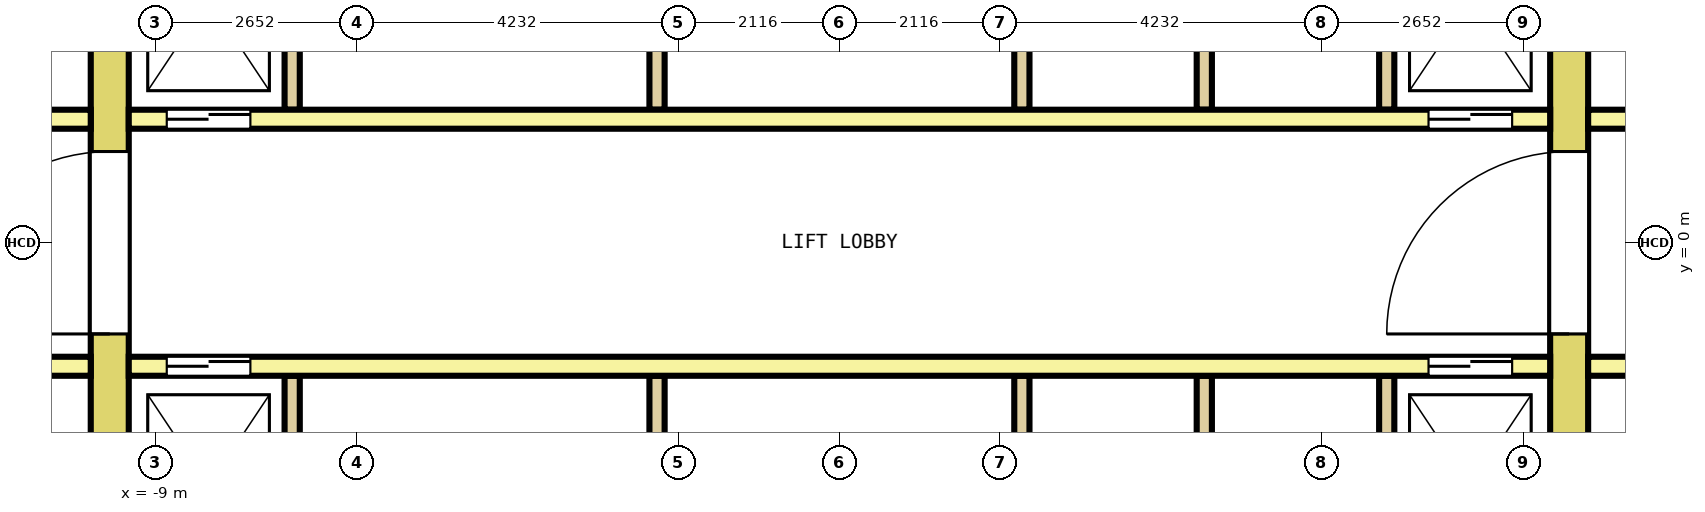
"""IFC4 building model, lengths in metres.
Left out: names, types, materials, properties, quantities, classifications, styles, units other than length and angle.
Written with IfcOpenShell. Run it as: python <this file> out.ifc"""

import sys

from ifc_helpers import new_model, si_unit, direction, frame, frame_2d, origin, place, context, subcontext, project, spatial, rectangle, extrude, element, fill, save


model = new_model("IFC4")
c1 = context("Model", 3, precision=1e-05, world=origin(), true_north=direction((0.0, 1.0)))
c2 = subcontext(c1, "Body", "Model", "MODEL_VIEW")
j1 = project(units=[si_unit("LENGTHUNIT", "METRE"), si_unit("PLANEANGLEUNIT", "RADIAN")], contexts=[c1])
p1 = place(None, origin())
s1 = spatial("IfcSite", under=j1, at=p1, CompositionType="ELEMENT")
p2 = place(p1, origin())
s2 = spatial("IfcBuilding", under=s1, at=p2, CompositionType="ELEMENT")
p3 = place(p2, frame((0.0, 0.0, 85.2)))
s3 = spatial("IfcBuildingStorey", under=s2, at=p3, CompositionType="ELEMENT", Elevation=85.2)
p4 = place(p3, frame((-9.6, -7.7, 0.0), z_axis=(0.0, 0.0, 1.0), x_axis=(0.0, 1.0, 0.0)))
e1 = element("IfcWall", 1, at=p4, inside=s3, PredefinedType="SHEAR", context=c2, shape_type="SweptSolid", body=[
    extrude(rectangle(XDim=15.4, YDim=0.5, at=frame_2d((7.7, 0.0))), origin(), (0.0, 0.0, 1.0), 4.1),
])
p5 = place(p4, frame((6.5, 0.0, 0.0)))
e2 = element("IfcOpeningElement", 2, at=p5, cuts=e1, PredefinedType="OPENING", context=c2, shape_type="SweptSolid", body=[
    extrude(rectangle(XDim=2.4, YDim=2.1, at=frame_2d((1.2, 1.05))), frame((0.0, 0.26, 0.0), z_axis=(0.0, -1.0, 0.0), x_axis=(1.0, 0.0, 0.0)), (0.0, 0.0, 1.0), 0.52),
])
p6 = place(p4, frame((13.4, 0.0, 0.0)))
e3 = element("IfcOpeningElement", 3, at=p6, cuts=e1, PredefinedType="OPENING", context=c2, shape_type="SweptSolid", body=[
    extrude(rectangle(XDim=1.2, YDim=2.1, at=frame_2d((0.6, 1.05))), frame((0.0, 0.26, 0.0), z_axis=(0.0, -1.0, 0.0), x_axis=(1.0, 0.0, 0.0)), (0.0, 0.0, 1.0), 0.52),
])
p7 = place(p4, frame((0.8, 0.0, 0.0)))
e4 = element("IfcOpeningElement", 4, at=p7, cuts=e1, PredefinedType="OPENING", context=c2, shape_type="SweptSolid", body=[
    extrude(rectangle(XDim=1.2, YDim=2.1, at=frame_2d((0.6, 1.05))), frame((0.0, 0.26, 0.0), z_axis=(0.0, -1.0, 0.0), x_axis=(1.0, 0.0, 0.0)), (0.0, 0.0, 1.0), 0.52),
])
p8 = place(p3, frame((9.6, -7.7, 0.0), z_axis=(0.0, 0.0, 1.0), x_axis=(0.0, 1.0, 0.0)))
e5 = element("IfcWall", 5, at=p8, inside=s3, PredefinedType="SHEAR", context=c2, shape_type="SweptSolid", body=[
    extrude(rectangle(XDim=15.4, YDim=0.5, at=frame_2d((7.7, 0.0))), origin(), (0.0, 0.0, 1.0), 4.1),
])
p9 = place(p8, frame((6.5, 0.0, 0.0)))
e6 = element("IfcOpeningElement", 6, at=p9, cuts=e5, PredefinedType="OPENING", context=c2, shape_type="SweptSolid", body=[
    extrude(rectangle(XDim=2.4, YDim=2.1, at=frame_2d((1.2, 1.05))), frame((0.0, 0.26, 0.0), z_axis=(0.0, -1.0, 0.0), x_axis=(1.0, 0.0, 0.0)), (0.0, 0.0, 1.0), 0.52),
])
p10 = place(p8, frame((13.4, 0.0, 0.0)))
e7 = element("IfcOpeningElement", 7, at=p10, cuts=e5, PredefinedType="OPENING", context=c2, shape_type="SweptSolid", body=[
    extrude(rectangle(XDim=1.2, YDim=2.1, at=frame_2d((0.6, 1.05))), frame((0.0, 0.26, 0.0), z_axis=(0.0, -1.0, 0.0), x_axis=(1.0, 0.0, 0.0)), (0.0, 0.0, 1.0), 0.52),
])
p11 = place(p8, frame((0.9, 0.0, 0.0)))
e8 = element("IfcOpeningElement", 8, at=p11, cuts=e5, PredefinedType="OPENING", context=c2, shape_type="SweptSolid", body=[
    extrude(rectangle(XDim=1.0, YDim=2.1, at=frame_2d((0.5, 1.05))), frame((0.0, 0.26, 0.0), z_axis=(0.0, -1.0, 0.0), x_axis=(1.0, 0.0, 0.0)), (0.0, 0.0, 1.0), 0.52),
])
p12 = place(p3, frame((-12.8, 1.625, 0.0), z_axis=(0.0, 0.0, 1.0), x_axis=(1.0, 0.0, 0.0)))
e9 = element("IfcWall", 9, at=p12, inside=s3, PredefinedType="SOLIDWALL", context=c2, shape_type="SweptSolid", body=[
    extrude(rectangle(XDim=2.95, YDim=0.25, at=frame_2d((1.475, 0.0))), origin(), (0.0, 0.0, 1.0), 4.1),
])
p13 = place(p12, frame((0.925, 0.0, 0.0)))
e10 = element("IfcOpeningElement", 10, at=p13, cuts=e9, PredefinedType="OPENING", context=c2, shape_type="SweptSolid", body=[
    extrude(rectangle(XDim=1.1, YDim=2.1, at=frame_2d((0.55, 1.05))), frame((0.0, 0.135, 0.0), z_axis=(0.0, -1.0, 0.0), x_axis=(1.0, 0.0, 0.0)), (0.0, 0.0, 1.0), 0.27),
])
p14 = place(p3, frame((-9.35, 1.625, 0.0), z_axis=(0.0, 0.0, 1.0), x_axis=(1.0, 0.0, 0.0)))
e11 = element("IfcWall", 11, at=p14, inside=s3, PredefinedType="SOLIDWALL", context=c2, shape_type="SweptSolid", body=[
    extrude(rectangle(XDim=18.7, YDim=0.25, at=frame_2d((9.35, 0.0))), origin(), (0.0, 0.0, 1.0), 4.1),
])
p15 = place(p14, frame((0.5, 0.0, 0.0)))
e12 = element("IfcOpeningElement", 12, at=p15, cuts=e11, PredefinedType="OPENING", context=c2, shape_type="SweptSolid", body=[
    extrude(rectangle(XDim=1.1, YDim=2.1, at=frame_2d((0.55, 1.05))), frame((0.0, 0.135, 0.0), z_axis=(0.0, -1.0, 0.0), x_axis=(1.0, 0.0, 0.0)), (0.0, 0.0, 1.0), 0.27),
])
p16 = place(p14, frame((17.1, 0.0, 0.0)))
e13 = element("IfcOpeningElement", 13, at=p16, cuts=e11, PredefinedType="OPENING", context=c2, shape_type="SweptSolid", body=[
    extrude(rectangle(XDim=1.1, YDim=2.1, at=frame_2d((0.55, 1.05))), frame((0.0, 0.135, 0.0), z_axis=(0.0, -1.0, 0.0), x_axis=(1.0, 0.0, 0.0)), (0.0, 0.0, 1.0), 0.27),
])
p17 = place(p3, frame((9.85, 1.625, 0.0), z_axis=(0.0, 0.0, 1.0), x_axis=(1.0, 0.0, 0.0)))
e14 = element("IfcWall", 14, at=p17, inside=s3, PredefinedType="SOLIDWALL", context=c2, shape_type="SweptSolid", body=[
    extrude(rectangle(XDim=2.95, YDim=0.25, at=frame_2d((1.475, 0.0))), origin(), (0.0, 0.0, 1.0), 4.1),
])
p18 = place(p17, frame((0.925, 0.0, 0.0)))
e15 = element("IfcOpeningElement", 15, at=p18, cuts=e14, PredefinedType="OPENING", context=c2, shape_type="SweptSolid", body=[
    extrude(rectangle(XDim=1.1, YDim=2.1, at=frame_2d((0.55, 1.05))), frame((0.0, 0.135, 0.0), z_axis=(0.0, -1.0, 0.0), x_axis=(1.0, 0.0, 0.0)), (0.0, 0.0, 1.0), 0.27),
])
for number, where, z_axis, x_axis in (
    (16, (-7.2, 1.75, 0.0), (0.0, 0.0, 1.0), (0.0, 1.0, 0.0)),
    (17, (-2.4, 1.75, 0.0), (0.0, 0.0, 1.0), (0.0, 1.0, 0.0)),
    (18, (2.4, 1.75, 0.0), (0.0, 0.0, 1.0), (0.0, 1.0, 0.0)),
    (19, (4.8, 1.75, 0.0), (0.0, 0.0, 1.0), (0.0, 1.0, 0.0)),
    (20, (7.2, 1.75, 0.0), (0.0, 0.0, 1.0), (0.0, 1.0, 0.0)),
):
    element("IfcWall", number, at=place(p3, frame(where, z_axis=z_axis, x_axis=x_axis)), inside=s3, PredefinedType="SOLIDWALL", context=c2, shape_type="SweptSolid", body=[
        extrude(rectangle(XDim=2.9, YDim=0.2, at=frame_2d((1.45, 0.0))), origin(), (0.0, 0.0, 1.0), 4.1),
    ])
p19 = place(p3, frame((-12.8, -1.625, 0.0), z_axis=(0.0, 0.0, 1.0), x_axis=(1.0, 0.0, 0.0)))
e21 = element("IfcWall", 21, at=p19, inside=s3, PredefinedType="SOLIDWALL", context=c2, shape_type="SweptSolid", body=[
    extrude(rectangle(XDim=2.95, YDim=0.25, at=frame_2d((1.475, 0.0))), origin(), (0.0, 0.0, 1.0), 4.1),
])
p20 = place(p19, frame((0.925, 0.0, 0.0)))
e22 = element("IfcOpeningElement", 22, at=p20, cuts=e21, PredefinedType="OPENING", context=c2, shape_type="SweptSolid", body=[
    extrude(rectangle(XDim=1.1, YDim=2.1, at=frame_2d((0.55, 1.05))), frame((0.0, 0.135, 0.0), z_axis=(0.0, -1.0, 0.0), x_axis=(1.0, 0.0, 0.0)), (0.0, 0.0, 1.0), 0.27),
])
p21 = place(p3, frame((-9.35, -1.625, 0.0), z_axis=(0.0, 0.0, 1.0), x_axis=(1.0, 0.0, 0.0)))
e23 = element("IfcWall", 23, at=p21, inside=s3, PredefinedType="SOLIDWALL", context=c2, shape_type="SweptSolid", body=[
    extrude(rectangle(XDim=18.7, YDim=0.25, at=frame_2d((9.35, 0.0))), origin(), (0.0, 0.0, 1.0), 4.1),
])
p22 = place(p21, frame((0.5, 0.0, 0.0)))
e24 = element("IfcOpeningElement", 24, at=p22, cuts=e23, PredefinedType="OPENING", context=c2, shape_type="SweptSolid", body=[
    extrude(rectangle(XDim=1.1, YDim=2.1, at=frame_2d((0.55, 1.05))), frame((0.0, 0.135, 0.0), z_axis=(0.0, -1.0, 0.0), x_axis=(1.0, 0.0, 0.0)), (0.0, 0.0, 1.0), 0.27),
])
p23 = place(p21, frame((17.1, 0.0, 0.0)))
e25 = element("IfcOpeningElement", 25, at=p23, cuts=e23, PredefinedType="OPENING", context=c2, shape_type="SweptSolid", body=[
    extrude(rectangle(XDim=1.1, YDim=2.1, at=frame_2d((0.55, 1.05))), frame((0.0, 0.135, 0.0), z_axis=(0.0, -1.0, 0.0), x_axis=(1.0, 0.0, 0.0)), (0.0, 0.0, 1.0), 0.27),
])
p24 = place(p3, frame((9.85, -1.625, 0.0), z_axis=(0.0, 0.0, 1.0), x_axis=(1.0, 0.0, 0.0)))
e26 = element("IfcWall", 26, at=p24, inside=s3, PredefinedType="SOLIDWALL", context=c2, shape_type="SweptSolid", body=[
    extrude(rectangle(XDim=2.95, YDim=0.25, at=frame_2d((1.475, 0.0))), origin(), (0.0, 0.0, 1.0), 4.1),
])
p25 = place(p24, frame((0.925, 0.0, 0.0)))
e27 = element("IfcOpeningElement", 27, at=p25, cuts=e26, PredefinedType="OPENING", context=c2, shape_type="SweptSolid", body=[
    extrude(rectangle(XDim=1.1, YDim=2.1, at=frame_2d((0.55, 1.05))), frame((0.0, 0.135, 0.0), z_axis=(0.0, -1.0, 0.0), x_axis=(1.0, 0.0, 0.0)), (0.0, 0.0, 1.0), 0.27),
])
for number, where, z_axis, x_axis in (
    (28, (-7.2, -4.65, 0.0), (0.0, 0.0, 1.0), (0.0, 1.0, 0.0)),
    (29, (-2.4, -4.65, 0.0), (0.0, 0.0, 1.0), (0.0, 1.0, 0.0)),
    (30, (2.4, -4.65, 0.0), (0.0, 0.0, 1.0), (0.0, 1.0, 0.0)),
    (31, (4.8, -4.65, 0.0), (0.0, 0.0, 1.0), (0.0, 1.0, 0.0)),
    (32, (7.2, -4.65, 0.0), (0.0, 0.0, 1.0), (0.0, 1.0, 0.0)),
):
    element("IfcWall", number, at=place(p3, frame(where, z_axis=z_axis, x_axis=x_axis)), inside=s3, PredefinedType="SOLIDWALL", context=c2, shape_type="SweptSolid", body=[
        extrude(rectangle(XDim=2.9, YDim=0.2, at=frame_2d((1.45, 0.0))), origin(), (0.0, 0.0, 1.0), 4.1),
    ])
p26 = place(p15, origin())
e33 = element("IfcDoor", 33, at=p26, inside=s3, OperationType="DOUBLE_DOOR_SLIDING", PredefinedType="DOOR", context=c2, shape_type="SweptSolid", body=[
    extrude(rectangle(XDim=1.1, YDim=2.1, at=frame_2d((0.55, 1.05))), frame((0.0, 0.075, 0.0), z_axis=(0.0, -1.0, 0.0), x_axis=(1.0, 0.0, 0.0)), (0.0, 0.0, 1.0), 0.15),
])
fill(e12, e33)
p27 = place(p16, origin())
e34 = element("IfcDoor", 34, at=p27, inside=s3, OperationType="DOUBLE_DOOR_SLIDING", PredefinedType="DOOR", context=c2, shape_type="SweptSolid", body=[
    extrude(rectangle(XDim=1.1, YDim=2.1, at=frame_2d((0.55, 1.05))), frame((0.0, 0.075, 0.0), z_axis=(0.0, -1.0, 0.0), x_axis=(1.0, 0.0, 0.0)), (0.0, 0.0, 1.0), 0.15),
])
fill(e13, e34)
p28 = place(p22, origin())
e35 = element("IfcDoor", 35, at=p28, inside=s3, OperationType="DOUBLE_DOOR_SLIDING", PredefinedType="DOOR", context=c2, shape_type="SweptSolid", body=[
    extrude(rectangle(XDim=1.1, YDim=2.1, at=frame_2d((0.55, 1.05))), frame((0.0, 0.075, 0.0), z_axis=(0.0, -1.0, 0.0), x_axis=(1.0, 0.0, 0.0)), (0.0, 0.0, 1.0), 0.15),
])
fill(e24, e35)
p29 = place(p23, origin())
e36 = element("IfcDoor", 36, at=p29, inside=s3, OperationType="DOUBLE_DOOR_SLIDING", PredefinedType="DOOR", context=c2, shape_type="SweptSolid", body=[
    extrude(rectangle(XDim=1.1, YDim=2.1, at=frame_2d((0.55, 1.05))), frame((0.0, 0.075, 0.0), z_axis=(0.0, -1.0, 0.0), x_axis=(1.0, 0.0, 0.0)), (0.0, 0.0, 1.0), 0.15),
])
fill(e25, e36)
p30 = place(p5, origin())
e37 = element("IfcDoor", 37, at=p30, inside=s3, OperationType="DOUBLE_DOOR_SINGLE_SWING", PredefinedType="DOOR", context=c2, shape_type="SweptSolid", body=[
    extrude(rectangle(XDim=2.4, YDim=2.1, at=frame_2d((1.2, 1.05))), frame((0.0, 0.2, 0.0), z_axis=(0.0, -1.0, 0.0), x_axis=(1.0, 0.0, 0.0)), (0.0, 0.0, 1.0), 0.4),
])
fill(e2, e37)
p31 = place(p9, origin())
e38 = element("IfcDoor", 38, at=p31, inside=s3, OperationType="DOUBLE_DOOR_SINGLE_SWING", PredefinedType="DOOR", context=c2, shape_type="SweptSolid", body=[
    extrude(rectangle(XDim=2.4, YDim=2.1, at=frame_2d((1.2, 1.05))), frame((0.0, 0.2, 0.0), z_axis=(0.0, -1.0, 0.0), x_axis=(1.0, 0.0, 0.0)), (0.0, 0.0, 1.0), 0.4),
])
fill(e6, e38)
save(model, sys.argv[1])
